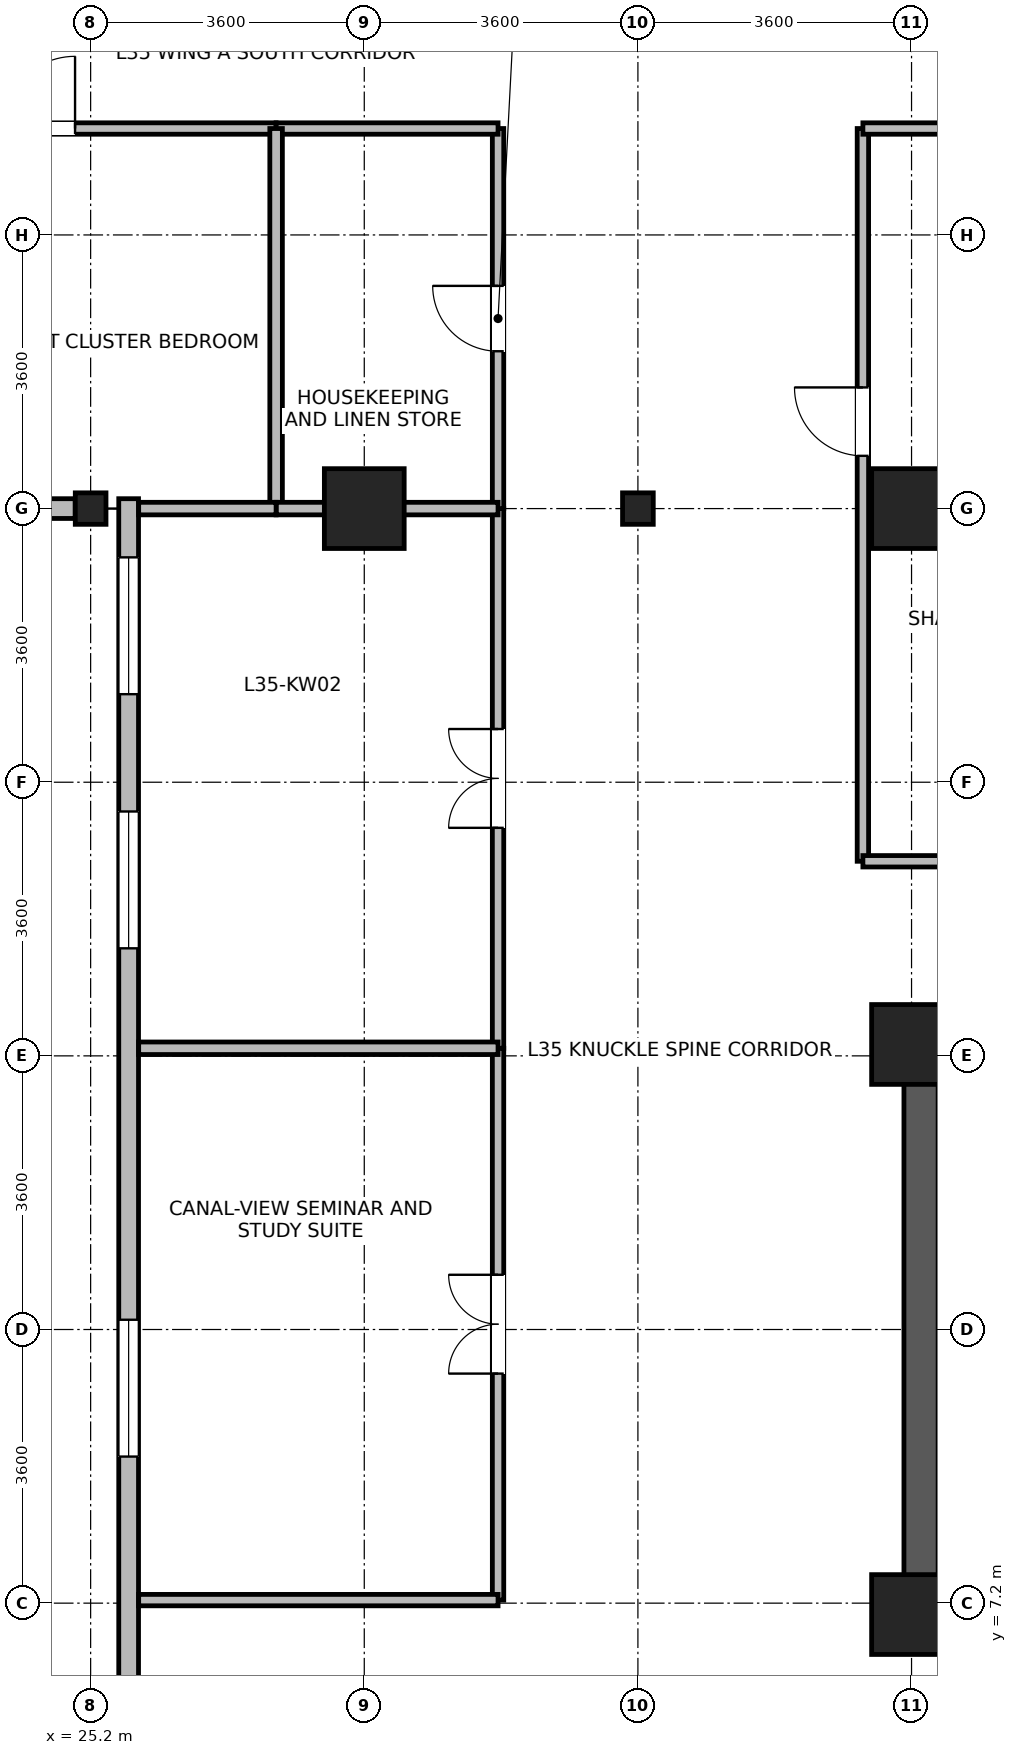
"""IFC4 building model, lengths in metres.
Left out: names, types, materials, properties, quantities, classifications, styles, units other than length and angle.
Written with IfcOpenShell. Run it as: python <this file> out.ifc"""

import sys

from ifc_helpers import new_model, si_unit, direction, frame, frame_2d, origin, origin_2d, place, context, subcontext, project, spatial, rectangle, i_section, extrude, source, transform, mapped, element, fill, save


model = new_model("IFC4")
c1 = context("Model", 3, precision=1e-05, world=origin(), true_north=direction((0.0, 1.0)))
c2 = subcontext(c1, "Body", "Model", "MODEL_VIEW")
j1 = project(units=[si_unit("LENGTHUNIT", "METRE"), si_unit("PLANEANGLEUNIT", "RADIAN")], contexts=[c1])
p1 = place(None, origin())
s1 = spatial("IfcSite", under=j1, at=p1, CompositionType="ELEMENT")
p2 = place(p1, origin())
s2 = spatial("IfcBuilding", under=s1, at=p2, CompositionType="ELEMENT")
p3 = place(p2, frame((0.0, 0.0, 140.2)))
s3 = spatial("IfcBuildingStorey", under=s2, at=p3, CompositionType="ELEMENT", Elevation=140.2)
p4 = place(p3, frame((36.125, 6.85, 0.0), z_axis=(0.0, 0.0, 1.0), x_axis=(0.0, 1.0, 0.0)))
e1 = element("IfcWall", 1, at=p4, inside=s3, PredefinedType="SHEAR", context=c2, shape_type="SweptSolid", body=[
    extrude(rectangle(XDim=7.9, YDim=0.45, at=frame_2d((3.95, 0.0))), origin(), (0.0, 0.0, 1.0), 3.46),
])
m1 = source(origin(), c2, "Body", "SweptSolid", [
    extrude(rectangle(XDim=1.05, YDim=1.05, at=origin_2d()), origin(), (0.0, 0.0, 1.0), 3.7),
])
for number, where, z_axis, x_axis in (
    (2, (28.8, 21.6, 0.0), (0.0, 0.0, 1.0), (1.0, 0.0, 0.0)),
    (3, (36.0, 21.6, 0.0), (0.0, 0.0, 1.0), (1.0, 0.0, 0.0)),
    (4, (36.0, 7.05, 0.0), (0.0, 0.0, 1.0), (1.0, 0.0, 0.0)),
    (5, (36.0, 14.55, 0.0), (0.0, 0.0, 1.0), (1.0, 0.0, 0.0)),
):
    element("IfcColumn", number, at=place(p3, frame(where, z_axis=z_axis, x_axis=x_axis)), inside=s3, PredefinedType="COLUMN", context=c2, shape_type="MappedRepresentation", body=[
        mapped(m1, transform((0.0, 0.0, 0.0), x_axis=(1.0, 0.0, 0.0), y_axis=(0.0, 1.0, 0.0), z_axis=(0.0, 0.0, 1.0), scale=1.0)),
    ])
m2 = source(origin(), c2, "Body", "SweptSolid", [
    extrude(i_section(OverallWidth=0.404, OverallDepth=0.414, WebThickness=0.021, FlangeThickness=0.028, FilletRadius=0.015, at=origin_2d()), origin(), (0.0, 0.0, 1.0), 3.7),
])
for number, where, z_axis, x_axis in (
    (6, (25.2, 21.6, 0.0), (0.0, 0.0, 1.0), (1.0, 0.0, 0.0)),
    (7, (32.4, 21.6, 0.0), (0.0, 0.0, 1.0), (1.0, 0.0, 0.0)),
):
    element("IfcColumn", number, at=place(p3, frame(where, z_axis=z_axis, x_axis=x_axis)), inside=s3, PredefinedType="COLUMN", context=c2, shape_type="MappedRepresentation", body=[
        mapped(m2, transform((0.0, 0.0, 0.0), x_axis=(1.0, 0.0, 0.0), y_axis=(0.0, 1.0, 0.0), z_axis=(0.0, 0.0, 1.0), scale=1.0)),
    ])
p5 = place(p3, frame((24.997, 21.6, 0.0), z_axis=(0.0, 0.0, 1.0), x_axis=(-1.0, 0.0, 0.0)))
e8 = element("IfcWall", 8, at=p5, inside=s3, PredefinedType="STANDARD", context=c2, shape_type="SweptSolid", body=[
    extrude(rectangle(XDim=2.871, YDim=0.26, at=frame_2d((1.436, 0.0))), origin(), (0.0, 0.0, 1.0), 2.99),
])
p6 = place(p5, frame((0.96, 0.0, 0.85)))
e9 = element("IfcOpeningElement", 9, at=p6, cuts=e8, PredefinedType="OPENING", context=c2, shape_type="SweptSolid", body=[
    extrude(rectangle(XDim=0.95, YDim=1.75, at=frame_2d((0.475, 0.875))), frame((0.0, 0.14, 0.0), z_axis=(0.0, -1.0, 0.0), x_axis=(1.0, 0.0, 0.0)), (0.0, 0.0, 1.0), 0.28),
])
p7 = place(p3, frame((25.7, 1.67, 0.0), z_axis=(0.0, 0.0, 1.0), x_axis=(0.0, 1.0, 0.0)))
e10 = element("IfcWall", 10, at=p7, inside=s3, PredefinedType="STANDARD", context=c2, shape_type="SweptSolid", body=[
    extrude(rectangle(XDim=20.06, YDim=0.26, at=frame_2d((10.03, 0.0))), origin(), (0.0, 0.0, 1.0), 3.44),
])
p8 = place(p7, frame((0.772, 0.0, 0.85)))
e11 = element("IfcOpeningElement", 11, at=p8, cuts=e10, PredefinedType="OPENING", context=c2, shape_type="SweptSolid", body=[
    extrude(rectangle(XDim=1.8, YDim=1.85, at=frame_2d((0.9, 0.925))), frame((0.0, 0.14, 0.0), z_axis=(0.0, -1.0, 0.0), x_axis=(1.0, 0.0, 0.0)), (0.0, 0.0, 1.0), 0.28),
])
p9 = place(p7, frame((7.458, 0.0, 0.85)))
e12 = element("IfcOpeningElement", 12, at=p9, cuts=e10, PredefinedType="OPENING", context=c2, shape_type="SweptSolid", body=[
    extrude(rectangle(XDim=1.8, YDim=1.85, at=frame_2d((0.9, 0.925))), frame((0.0, 0.14, 0.0), z_axis=(0.0, -1.0, 0.0), x_axis=(1.0, 0.0, 0.0)), (0.0, 0.0, 1.0), 0.28),
])
p10 = place(p7, frame((14.145, 0.0, 0.85)))
e13 = element("IfcOpeningElement", 13, at=p10, cuts=e10, PredefinedType="OPENING", context=c2, shape_type="SweptSolid", body=[
    extrude(rectangle(XDim=1.8, YDim=1.85, at=frame_2d((0.9, 0.925))), frame((0.0, 0.14, 0.0), z_axis=(0.0, -1.0, 0.0), x_axis=(1.0, 0.0, 0.0)), (0.0, 0.0, 1.0), 0.28),
])
p11 = place(p7, frame((17.488, 0.0, 0.85)))
e14 = element("IfcOpeningElement", 14, at=p11, cuts=e10, PredefinedType="OPENING", context=c2, shape_type="SweptSolid", body=[
    extrude(rectangle(XDim=1.8, YDim=1.85, at=frame_2d((0.9, 0.925))), frame((0.0, 0.14, 0.0), z_axis=(0.0, -1.0, 0.0), x_axis=(1.0, 0.0, 0.0)), (0.0, 0.0, 1.0), 0.28),
])
p12 = place(p3, frame((35.36, 16.96, 0.0), z_axis=(0.0, 0.0, 1.0), x_axis=(0.0, 1.0, 0.0)))
e15 = element("IfcWall", 15, at=p12, inside=s3, PredefinedType="PARTITIONING", context=c2, shape_type="SweptSolid", body=[
    extrude(rectangle(XDim=9.64, YDim=0.15, at=frame_2d((4.82, 0.0))), origin(), (0.0, 0.0, 1.0), 3.44),
])
p13 = place(p12, frame((5.334, 0.0, 0.0)))
e16 = element("IfcOpeningElement", 16, at=p13, cuts=e15, PredefinedType="OPENING", context=c2, shape_type="SweptSolid", body=[
    extrude(rectangle(XDim=0.9, YDim=2.08, at=frame_2d((0.45, 1.04))), frame((0.0, 0.085, 0.0), z_axis=(0.0, -1.0, 0.0), x_axis=(1.0, 0.0, 0.0)), (0.0, 0.0, 1.0), 0.17),
])
p14 = place(p3, frame((30.56, 7.24, 0.0), z_axis=(0.0, 0.0, 1.0), x_axis=(0.0, 1.0, 0.0)))
e17 = element("IfcWall", 17, at=p14, inside=s3, PredefinedType="PARTITIONING", context=c2, shape_type="SweptSolid", body=[
    extrude(rectangle(XDim=7.26, YDim=0.15, at=frame_2d((3.63, 0.0))), origin(), (0.0, 0.0, 1.0), 3.44),
])
p15 = place(p14, frame((2.98, 0.0, 0.0)))
e18 = element("IfcOpeningElement", 18, at=p15, cuts=e17, PredefinedType="OPENING", context=c2, shape_type="SweptSolid", body=[
    extrude(rectangle(XDim=1.3, YDim=2.12, at=frame_2d((0.65, 1.06))), frame((0.0, 0.085, 0.0), z_axis=(0.0, -1.0, 0.0), x_axis=(1.0, 0.0, 0.0)), (0.0, 0.0, 1.0), 0.17),
])
p16 = place(p3, frame((30.56, 14.5, 0.0), z_axis=(0.0, 0.0, 1.0), x_axis=(0.0, 1.0, 0.0)))
e19 = element("IfcWall", 19, at=p16, inside=s3, PredefinedType="PARTITIONING", context=c2, shape_type="SweptSolid", body=[
    extrude(rectangle(XDim=7.1, YDim=0.15, at=frame_2d((3.55, 0.0))), origin(), (0.0, 0.0, 1.0), 3.44),
])
p17 = place(p16, frame((2.9, 0.0, 0.0)))
e20 = element("IfcOpeningElement", 20, at=p17, cuts=e19, PredefinedType="OPENING", context=c2, shape_type="SweptSolid", body=[
    extrude(rectangle(XDim=1.3, YDim=2.12, at=frame_2d((0.65, 1.06))), frame((0.0, 0.085, 0.0), z_axis=(0.0, -1.0, 0.0), x_axis=(1.0, 0.0, 0.0)), (0.0, 0.0, 1.0), 0.17),
])
for number, where, z_axis, x_axis in (
    (21, (35.36, 16.96, 0.0), (0.0, 0.0, 1.0), (1.0, 0.0, 0.0)),
    (22, (35.36, 26.6, 0.0), (0.0, 0.0, 1.0), (1.0, 0.0, 0.0)),
):
    element("IfcWall", number, at=place(p3, frame(where, z_axis=z_axis, x_axis=x_axis)), inside=s3, PredefinedType="PARTITIONING", context=c2, shape_type="SweptSolid", body=[
        extrude(rectangle(XDim=6.38, YDim=0.15, at=frame_2d((3.19, 0.0))), origin(), (0.0, 0.0, 1.0), 3.44),
    ])
p18 = place(p3, frame((21.4, 26.6, 0.0), z_axis=(0.0, 0.0, 1.0), x_axis=(1.0, 0.0, 0.0)))
e23 = element("IfcWall", 23, at=p18, inside=s3, PredefinedType="PARTITIONING", context=c2, shape_type="SweptSolid", body=[
    extrude(rectangle(XDim=6.24, YDim=0.15, at=frame_2d((3.12, 0.0))), origin(), (0.0, 0.0, 1.0), 3.44),
])
p19 = place(p18, frame((2.645, 0.0, 0.0)))
e24 = element("IfcOpeningElement", 24, at=p19, cuts=e23, PredefinedType="OPENING", context=c2, shape_type="SweptSolid", body=[
    extrude(rectangle(XDim=0.95, YDim=2.1, at=frame_2d((0.475, 1.05))), frame((0.0, 0.085, 0.0), z_axis=(0.0, -1.0, 0.0), x_axis=(1.0, 0.0, 0.0)), (0.0, 0.0, 1.0), 0.17),
])
p20 = place(p3, frame((30.56, 21.6, 0.0), z_axis=(0.0, 0.0, 1.0), x_axis=(0.0, 1.0, 0.0)))
e25 = element("IfcWall", 25, at=p20, inside=s3, PredefinedType="PARTITIONING", context=c2, shape_type="SweptSolid", body=[
    extrude(rectangle(XDim=5.0, YDim=0.15, at=frame_2d((2.5, 0.0))), origin(), (0.0, 0.0, 1.0), 3.44),
])
p21 = place(p20, frame((2.07, 0.0, 0.0)))
e26 = element("IfcOpeningElement", 26, at=p21, cuts=e25, PredefinedType="OPENING", context=c2, shape_type="SweptSolid", body=[
    extrude(rectangle(XDim=0.86, YDim=2.02, at=frame_2d((0.43, 1.01))), frame((0.0, 0.085, 0.0), z_axis=(0.0, -1.0, 0.0), x_axis=(1.0, 0.0, 0.0)), (0.0, 0.0, 1.0), 0.17),
])
p22 = place(p3, frame((25.832, 7.24, 0.0), z_axis=(0.0, 0.0, 1.0), x_axis=(1.0, 0.0, 0.0)))
e27 = element("IfcWall", 27, at=p22, inside=s3, PredefinedType="PARTITIONING", context=c2, shape_type="SweptSolid", body=[
    extrude(rectangle(XDim=4.728, YDim=0.15, at=frame_2d((2.364, 0.0))), origin(), (0.0, 0.0, 1.0), 3.44),
])
p23 = place(p3, frame((27.64, 26.6, 0.0), z_axis=(0.0, 0.0, 1.0), x_axis=(1.0, 0.0, 0.0)))
e28 = element("IfcWall", 28, at=p23, inside=s3, PredefinedType="PARTITIONING", context=c2, shape_type="SweptSolid", body=[
    extrude(rectangle(XDim=2.92, YDim=0.15, at=frame_2d((1.46, 0.0))), origin(), (0.0, 0.0, 1.0), 3.44),
])
p24 = place(p3, frame((27.64, 21.6, 0.0), z_axis=(0.0, 0.0, 1.0), x_axis=(0.0, 1.0, 0.0)))
e29 = element("IfcWall", 29, at=p24, inside=s3, PredefinedType="PARTITIONING", context=c2, shape_type="SweptSolid", body=[
    extrude(rectangle(XDim=5.0, YDim=0.165, at=frame_2d((2.5, 0.0))), origin(), (0.0, 0.0, 1.0), 3.44),
])
p25 = place(p3, frame((25.832, 14.5, 0.0), z_axis=(0.0, 0.0, 1.0), x_axis=(1.0, 0.0, 0.0)))
e30 = element("IfcWall", 30, at=p25, inside=s3, PredefinedType="PARTITIONING", context=c2, shape_type="SweptSolid", body=[
    extrude(rectangle(XDim=4.728, YDim=0.165, at=frame_2d((2.364, 0.0))), origin(), (0.0, 0.0, 1.0), 3.44),
])
p26 = place(p3, frame((27.64, 21.6, 0.0), z_axis=(0.0, 0.0, 1.0), x_axis=(1.0, 0.0, 0.0)))
e31 = element("IfcWall", 31, at=p26, inside=s3, PredefinedType="PARTITIONING", context=c2, shape_type="SweptSolid", body=[
    extrude(rectangle(XDim=2.92, YDim=0.165, at=frame_2d((1.46, 0.0))), origin(), (0.0, 0.0, 1.0), 2.99),
])
p27 = place(p3, frame((25.832, 21.6, 0.0), z_axis=(0.0, 0.0, 1.0), x_axis=(1.0, 0.0, 0.0)))
e32 = element("IfcWall", 32, at=p27, inside=s3, PredefinedType="PARTITIONING", context=c2, shape_type="SweptSolid", body=[
    extrude(rectangle(XDim=1.808, YDim=0.165, at=frame_2d((0.904, 0.0))), origin(), (0.0, 0.0, 1.0), 2.99),
])
p28 = place(p9, origin())
e33 = element("IfcWindow", 33, at=p28, inside=s3, PartitioningType="SINGLE_PANEL", PredefinedType="WINDOW", context=c2, shape_type="SweptSolid", body=[
    extrude(rectangle(XDim=1.8, YDim=1.85, at=frame_2d((0.9, 0.925))), frame((0.0, 0.03, 0.0), z_axis=(0.0, -1.0, 0.0), x_axis=(1.0, 0.0, 0.0)), (0.0, 0.0, 1.0), 0.06),
])
fill(e12, e33)
p29 = place(p10, origin())
e34 = element("IfcWindow", 34, at=p29, inside=s3, PartitioningType="SINGLE_PANEL", PredefinedType="WINDOW", context=c2, shape_type="SweptSolid", body=[
    extrude(rectangle(XDim=1.8, YDim=1.85, at=frame_2d((0.9, 0.925))), frame((0.0, 0.03, 0.0), z_axis=(0.0, -1.0, 0.0), x_axis=(1.0, 0.0, 0.0)), (0.0, 0.0, 1.0), 0.06),
])
fill(e13, e34)
p30 = place(p11, origin())
e35 = element("IfcWindow", 35, at=p30, inside=s3, PartitioningType="SINGLE_PANEL", PredefinedType="WINDOW", context=c2, shape_type="SweptSolid", body=[
    extrude(rectangle(XDim=1.8, YDim=1.85, at=frame_2d((0.9, 0.925))), frame((0.0, 0.03, 0.0), z_axis=(0.0, -1.0, 0.0), x_axis=(1.0, 0.0, 0.0)), (0.0, 0.0, 1.0), 0.06),
])
fill(e14, e35)
p31 = place(p13, origin())
e36 = element("IfcDoor", 36, at=p31, inside=s3, OperationType="SINGLE_SWING_RIGHT", PredefinedType="DOOR", context=c2, shape_type="SweptSolid", body=[
    extrude(rectangle(XDim=0.9, YDim=2.08, at=frame_2d((0.45, 1.04))), frame((0.0, 0.025, 0.0), z_axis=(0.0, -1.0, 0.0), x_axis=(1.0, 0.0, 0.0)), (0.0, 0.0, 1.0), 0.05),
])
fill(e16, e36)
p32 = place(p15, origin())
e37 = element("IfcDoor", 37, at=p32, inside=s3, OperationType="DOUBLE_DOOR_SINGLE_SWING", PredefinedType="DOOR", context=c2, shape_type="SweptSolid", body=[
    extrude(rectangle(XDim=1.3, YDim=2.12, at=frame_2d((0.65, 1.06))), frame((0.0, 0.025, 0.0), z_axis=(0.0, -1.0, 0.0), x_axis=(1.0, 0.0, 0.0)), (0.0, 0.0, 1.0), 0.05),
])
fill(e18, e37)
p33 = place(p17, origin())
e38 = element("IfcDoor", 38, at=p33, inside=s3, OperationType="DOUBLE_DOOR_SINGLE_SWING", PredefinedType="DOOR", context=c2, shape_type="SweptSolid", body=[
    extrude(rectangle(XDim=1.3, YDim=2.12, at=frame_2d((0.65, 1.06))), frame((0.0, 0.025, 0.0), z_axis=(0.0, -1.0, 0.0), x_axis=(1.0, 0.0, 0.0)), (0.0, 0.0, 1.0), 0.05),
])
fill(e20, e38)
p34 = place(p19, origin())
e39 = element("IfcDoor", 39, at=p34, inside=s3, OperationType="SINGLE_SWING_RIGHT", PredefinedType="DOOR", context=c2, shape_type="SweptSolid", body=[
    extrude(rectangle(XDim=0.95, YDim=2.1, at=frame_2d((0.475, 1.05))), frame((0.0, 0.025, 0.0), z_axis=(0.0, -1.0, 0.0), x_axis=(1.0, 0.0, 0.0)), (0.0, 0.0, 1.0), 0.05),
])
fill(e24, e39)
p35 = place(p21, origin())
e40 = element("IfcDoor", 40, at=p35, inside=s3, OperationType="SINGLE_SWING_RIGHT", PredefinedType="DOOR", context=c2, shape_type="SweptSolid", body=[
    extrude(rectangle(XDim=0.86, YDim=2.02, at=frame_2d((0.43, 1.01))), frame((0.0, 0.025, 0.0), z_axis=(0.0, -1.0, 0.0), x_axis=(1.0, 0.0, 0.0)), (0.0, 0.0, 1.0), 0.05),
])
fill(e26, e40)
save(model, sys.argv[1])
